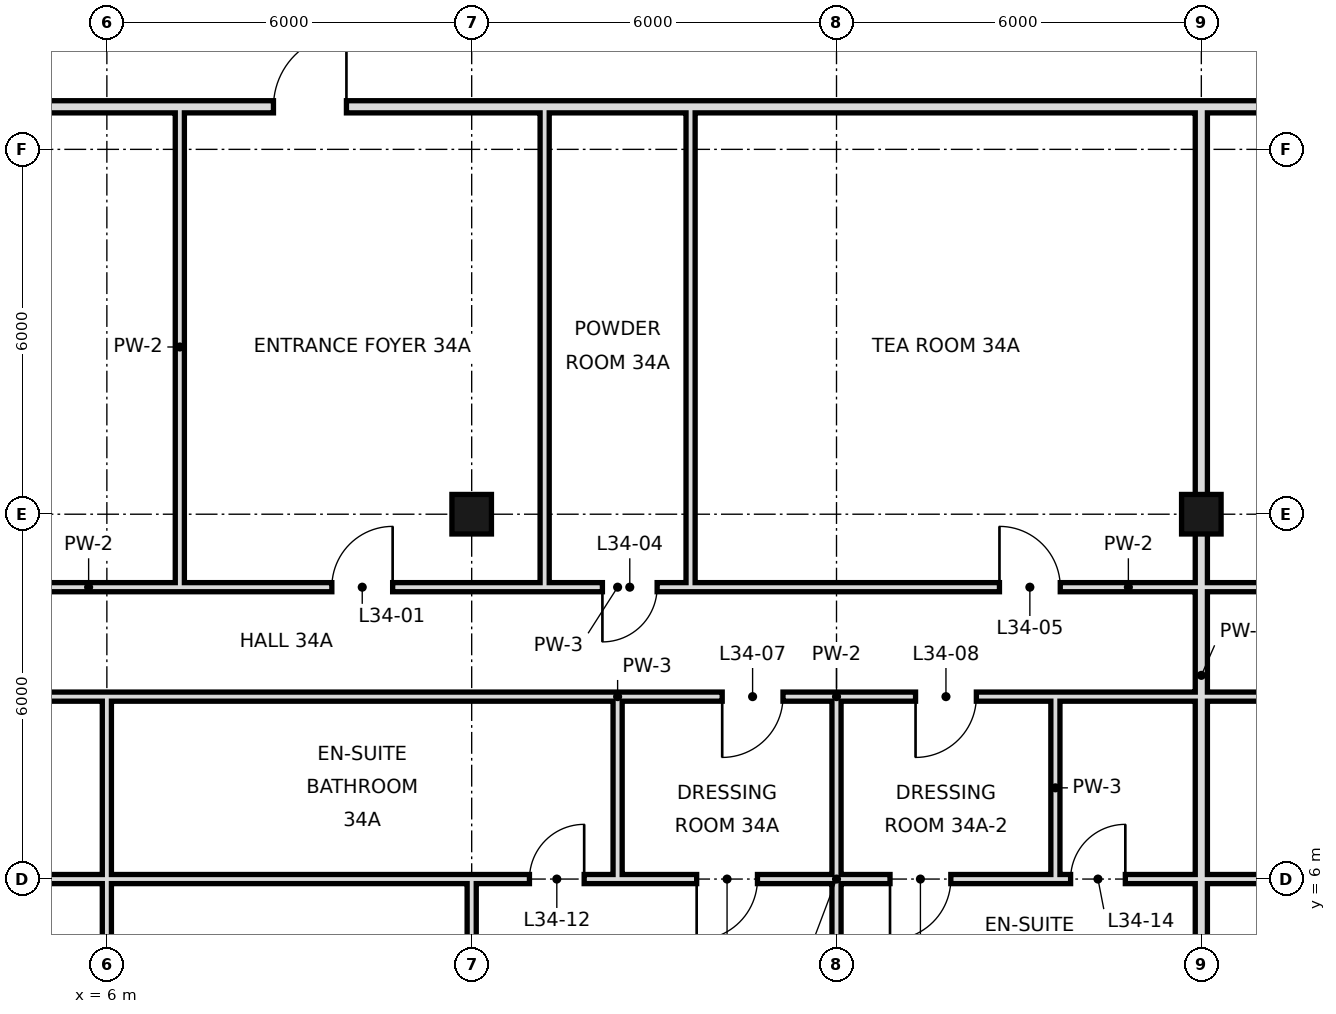
"""IFC4 building model, lengths in metres.
Left out: names, types, materials, properties, quantities, classifications, styles, units other than length and angle.
Written with IfcOpenShell. Run it as: python <this file> out.ifc"""

import sys

from ifc_helpers import new_model, si_unit, direction, frame, frame_2d, origin, origin_2d, place, context, subcontext, project, spatial, rectangle, hollow_rectangle, extrude, element, fill, save


model = new_model("IFC4")
c1 = context("Model", 3, precision=1e-05, world=origin(), true_north=direction((0.0, 1.0)))
c2 = subcontext(c1, "Body", "Model", "MODEL_VIEW")
j1 = project(units=[si_unit("LENGTHUNIT", "METRE"), si_unit("PLANEANGLEUNIT", "RADIAN")], contexts=[c1])
p1 = place(None, origin())
s1 = spatial("IfcSite", under=j1, at=p1, CompositionType="ELEMENT")
p2 = place(p1, origin())
s2 = spatial("IfcBuilding", under=s1, at=p2, CompositionType="ELEMENT")
p3 = place(p2, frame((0.0, 0.0, 151.0)))
s3 = spatial("IfcBuildingStorey", under=s2, at=p3, CompositionType="ELEMENT", Elevation=151.0)
for number, where, z_axis, x_axis in (
    (1, (12.0, 12.0, 0.0), (0.0, 0.0, 1.0), (1.0, 0.0, 0.0)),
    (2, (24.0, 12.0, 0.0), (0.0, 0.0, 1.0), (1.0, 0.0, 0.0)),
):
    element("IfcColumn", number, at=place(p3, frame(where, z_axis=z_axis, x_axis=x_axis)), inside=s3, PredefinedType="COLUMN", context=c2, shape_type="SweptSolid", body=[
        extrude(hollow_rectangle(XDim=0.65, YDim=0.65, WallThickness=0.032, at=origin_2d()), origin(), (0.0, 0.0, 1.0), 3.6),
    ])
p4 = place(p3, frame((12.0, 0.0, 0.0), z_axis=(0.0, 0.0, 1.0), x_axis=(0.0, 1.0, 0.0)))
e3 = element("IfcWall", 3, at=p4, inside=s3, PredefinedType="PARTITIONING", context=c2, shape_type="SweptSolid", body=[
    extrude(rectangle(XDim=6.0, YDim=0.15, at=frame_2d((3.0, 0.0))), origin(), (0.0, 0.0, 1.0), 2.72),
])
p5 = place(p4, frame((3.4, 0.0, 0.0)))
e4 = element("IfcOpeningElement", 4, at=p5, cuts=e3, PredefinedType="OPENING", context=c2, shape_type="SweptSolid", body=[
    extrude(rectangle(XDim=1.0, YDim=2.4, at=frame_2d((0.5, 1.2))), frame((0.0, 0.085, 0.0), z_axis=(0.0, -1.0, 0.0), x_axis=(1.0, 0.0, 0.0)), (0.0, 0.0, 1.0), 0.17),
])
p6 = place(p3, frame((13.2, 10.8, 0.0), z_axis=(0.0, 0.0, 1.0), x_axis=(0.0, 1.0, 0.0)))
e5 = element("IfcWall", 5, at=p6, inside=s3, PredefinedType="PARTITIONING", context=c2, shape_type="SweptSolid", body=[
    extrude(rectangle(XDim=7.9, YDim=0.15, at=frame_2d((3.95, 0.0))), origin(), (0.0, 0.0, 1.0), 3.42),
])
p7 = place(p3, frame((14.4, 6.0, 0.0), z_axis=(0.0, 0.0, 1.0), x_axis=(0.0, 1.0, 0.0)))
e6 = element("IfcWall", 6, at=p7, inside=s3, PredefinedType="PARTITIONING", context=c2, shape_type="SweptSolid", body=[
    extrude(rectangle(XDim=3.0, YDim=0.15, at=frame_2d((1.5, 0.0))), origin(), (0.0, 0.0, 1.0), 3.42),
])
p8 = place(p3, frame((15.6, 10.8, 0.0), z_axis=(0.0, 0.0, 1.0), x_axis=(0.0, 1.0, 0.0)))
e7 = element("IfcWall", 7, at=p8, inside=s3, PredefinedType="PARTITIONING", context=c2, shape_type="SweptSolid", body=[
    extrude(rectangle(XDim=7.9, YDim=0.15, at=frame_2d((3.95, 0.0))), origin(), (0.0, 0.0, 1.0), 3.42),
])
p9 = place(p3, frame((18.0, -0.6, 0.0), z_axis=(0.0, 0.0, 1.0), x_axis=(0.0, 1.0, 0.0)))
e8 = element("IfcWall", 8, at=p9, inside=s3, PredefinedType="PARTITIONING", context=c2, shape_type="SweptSolid", body=[
    extrude(rectangle(XDim=9.6, YDim=0.15, at=frame_2d((4.8, 0.0))), origin(), (0.0, 0.0, 1.0), 2.72),
])
p10 = place(p3, frame((21.6, 6.0, 0.0), z_axis=(0.0, 0.0, 1.0), x_axis=(0.0, 1.0, 0.0)))
e9 = element("IfcWall", 9, at=p10, inside=s3, PredefinedType="PARTITIONING", context=c2, shape_type="SweptSolid", body=[
    extrude(rectangle(XDim=3.0, YDim=0.15, at=frame_2d((1.5, 0.0))), origin(), (0.0, 0.0, 1.0), 3.42),
])
p11 = place(p3, frame((24.0, 0.0, 0.0), z_axis=(0.0, 0.0, 1.0), x_axis=(0.0, 1.0, 0.0)))
e10 = element("IfcWall", 10, at=p11, inside=s3, PredefinedType="SOLIDWALL", context=c2, shape_type="SweptSolid", body=[
    extrude(rectangle(XDim=18.7, YDim=0.2, at=frame_2d((9.35, 0.0))), origin(), (0.0, 0.0, 1.0), 2.72),
])
p12 = place(p3, frame((6.0, -0.6, 0.0), z_axis=(0.0, 0.0, 1.0), x_axis=(0.0, 1.0, 0.0)))
e11 = element("IfcWall", 11, at=p12, inside=s3, PredefinedType="PARTITIONING", context=c2, shape_type="SweptSolid", body=[
    extrude(rectangle(XDim=6.6, YDim=0.15, at=frame_2d((3.3, 0.0))), origin(), (0.0, 0.0, 1.0), 2.72),
])
p13 = place(p3, frame((6.0, 6.0, 0.0), z_axis=(0.0, 0.0, 1.0), x_axis=(0.0, 1.0, 0.0)))
e12 = element("IfcWall", 12, at=p13, inside=s3, PredefinedType="PARTITIONING", context=c2, shape_type="SweptSolid", body=[
    extrude(rectangle(XDim=3.0, YDim=0.15, at=frame_2d((1.5, 0.0))), origin(), (0.0, 0.0, 1.0), 2.72),
])
p14 = place(p3, frame((7.2, 10.8, 0.0), z_axis=(0.0, 0.0, 1.0), x_axis=(0.0, 1.0, 0.0)))
e13 = element("IfcWall", 13, at=p14, inside=s3, PredefinedType="PARTITIONING", context=c2, shape_type="SweptSolid", body=[
    extrude(rectangle(XDim=7.9, YDim=0.15, at=frame_2d((3.95, 0.0))), origin(), (0.0, 0.0, 1.0), 3.42),
])
p15 = place(p3, frame((-1.8, 10.8, 0.0), z_axis=(0.0, 0.0, 1.0), x_axis=(1.0, 0.0, 0.0)))
e14 = element("IfcWall", 14, at=p15, inside=s3, PredefinedType="PARTITIONING", context=c2, shape_type="SweptSolid", body=[
    extrude(rectangle(XDim=15.0, YDim=0.15, at=frame_2d((7.5, 0.0))), origin(), (0.0, 0.0, 1.0), 3.42),
])
p16 = place(p15, frame((11.5, 0.0, 0.0)))
e15 = element("IfcOpeningElement", 15, at=p16, cuts=e14, PredefinedType="OPENING", context=c2, shape_type="SweptSolid", body=[
    extrude(rectangle(XDim=1.0, YDim=2.4, at=frame_2d((0.5, 1.2))), frame((0.0, 0.085, 0.0), z_axis=(0.0, -1.0, 0.0), x_axis=(1.0, 0.0, 0.0)), (0.0, 0.0, 1.0), 0.17),
])
p17 = place(p15, frame((5.5, 0.0, 0.0)))
e16 = element("IfcOpeningElement", 16, at=p17, cuts=e14, PredefinedType="OPENING", context=c2, shape_type="SweptSolid", body=[
    extrude(rectangle(XDim=1.0, YDim=2.4, at=frame_2d((0.5, 1.2))), frame((0.0, 0.085, 0.0), z_axis=(0.0, -1.0, 0.0), x_axis=(1.0, 0.0, 0.0)), (0.0, 0.0, 1.0), 0.17),
])
p18 = place(p3, frame((15.6, 10.8, 0.0), z_axis=(0.0, 0.0, 1.0), x_axis=(1.0, 0.0, 0.0)))
e17 = element("IfcWall", 17, at=p18, inside=s3, PredefinedType="PARTITIONING", context=c2, shape_type="SweptSolid", body=[
    extrude(rectangle(XDim=14.4, YDim=0.15, at=frame_2d((7.2, 0.0))), origin(), (0.0, 0.0, 1.0), 3.42),
])
p19 = place(p18, frame((5.08, 0.0, 0.0)))
e18 = element("IfcOpeningElement", 18, at=p19, cuts=e17, PredefinedType="OPENING", context=c2, shape_type="SweptSolid", body=[
    extrude(rectangle(XDim=1.0, YDim=2.4, at=frame_2d((0.5, 1.2))), frame((0.0, 0.085, 0.0), z_axis=(0.0, -1.0, 0.0), x_axis=(1.0, 0.0, 0.0)), (0.0, 0.0, 1.0), 0.17),
])
p20 = place(p18, frame((10.9, 0.0, 0.0)))
e19 = element("IfcOpeningElement", 19, at=p20, cuts=e17, PredefinedType="OPENING", context=c2, shape_type="SweptSolid", body=[
    extrude(rectangle(XDim=1.0, YDim=2.4, at=frame_2d((0.5, 1.2))), frame((0.0, 0.085, 0.0), z_axis=(0.0, -1.0, 0.0), x_axis=(1.0, 0.0, 0.0)), (0.0, 0.0, 1.0), 0.17),
])
p21 = place(p3, frame((13.2, 10.8, 0.0), z_axis=(0.0, 0.0, 1.0), x_axis=(1.0, 0.0, 0.0)))
e20 = element("IfcWall", 20, at=p21, inside=s3, PredefinedType="PARTITIONING", context=c2, shape_type="SweptSolid", body=[
    extrude(rectangle(XDim=2.4, YDim=0.15, at=frame_2d((1.2, 0.0))), origin(), (0.0, 0.0, 1.0), 3.42),
])
p22 = place(p21, frame((0.95, 0.0, 0.0)))
e21 = element("IfcOpeningElement", 21, at=p22, cuts=e20, PredefinedType="OPENING", context=c2, shape_type="SweptSolid", body=[
    extrude(rectangle(XDim=0.9, YDim=2.4, at=frame_2d((0.45, 1.2))), frame((0.0, 0.085, 0.0), z_axis=(0.0, -1.0, 0.0), x_axis=(1.0, 0.0, 0.0)), (0.0, 0.0, 1.0), 0.17),
])
p23 = place(p3, frame((3.1, 18.7, 0.0), z_axis=(0.0, 0.0, 1.0), x_axis=(1.0, 0.0, 0.0)))
e22 = element("IfcWall", 22, at=p23, inside=s3, PredefinedType="SOLIDWALL", context=c2, shape_type="SweptSolid", body=[
    extrude(rectangle(XDim=41.8, YDim=0.2, at=frame_2d((20.9, 0.0))), origin(), (0.0, 0.0, 1.0), 2.72),
])
p24 = place(p23, frame((5.64, 0.0, 0.0)))
e23 = element("IfcOpeningElement", 23, at=p24, cuts=e22, PredefinedType="OPENING", context=c2, shape_type="SweptSolid", body=[
    extrude(rectangle(XDim=1.2, YDim=2.4, at=frame_2d((0.6, 1.2))), frame((0.0, 0.11, 0.0), z_axis=(0.0, -1.0, 0.0), x_axis=(1.0, 0.0, 0.0)), (0.0, 0.0, 1.0), 0.22),
])
p25 = place(p23, frame((24.16, 0.0, 0.0)))
e24 = element("IfcOpeningElement", 24, at=p25, cuts=e22, PredefinedType="OPENING", context=c2, shape_type="SweptSolid", body=[
    extrude(rectangle(XDim=1.2, YDim=2.4, at=frame_2d((0.6, 1.2))), frame((0.0, 0.11, 0.0), z_axis=(0.0, -1.0, 0.0), x_axis=(1.0, 0.0, 0.0)), (0.0, 0.0, 1.0), 0.22),
])
p26 = place(p3, frame((-6.0, 6.0, 0.0), z_axis=(0.0, 0.0, 1.0), x_axis=(1.0, 0.0, 0.0)))
e25 = element("IfcWall", 25, at=p26, inside=s3, PredefinedType="PARTITIONING", context=c2, shape_type="SweptSolid", body=[
    extrude(rectangle(XDim=12.0, YDim=0.15, at=frame_2d((6.0, 0.0))), origin(), (0.0, 0.0, 1.0), 2.97),
])
p27 = place(p26, frame((7.04, 0.0, 0.0)))
e26 = element("IfcOpeningElement", 26, at=p27, cuts=e25, PredefinedType="OPENING", context=c2, shape_type="SweptSolid", body=[
    extrude(rectangle(XDim=1.8, YDim=2.4, at=frame_2d((0.9, 1.2))), frame((0.0, 0.085, 0.0), z_axis=(0.0, -1.0, 0.0), x_axis=(1.0, 0.0, 0.0)), (0.0, 0.0, 1.0), 0.17),
])
p28 = place(p3, frame((14.4, 6.0, 0.0), z_axis=(0.0, 0.0, 1.0), x_axis=(1.0, 0.0, 0.0)))
e27 = element("IfcWall", 27, at=p28, inside=s3, PredefinedType="PARTITIONING", context=c2, shape_type="SweptSolid", body=[
    extrude(rectangle(XDim=7.2, YDim=0.15, at=frame_2d((3.6, 0.0))), origin(), (0.0, 0.0, 1.0), 2.97),
])
p29 = place(p28, frame((1.3, 0.0, 0.0)))
e28 = element("IfcOpeningElement", 28, at=p29, cuts=e27, PredefinedType="OPENING", context=c2, shape_type="SweptSolid", body=[
    extrude(rectangle(XDim=1.0, YDim=2.4, at=frame_2d((0.5, 1.2))), frame((0.0, 0.085, 0.0), z_axis=(0.0, -1.0, 0.0), x_axis=(1.0, 0.0, 0.0)), (0.0, 0.0, 1.0), 0.17),
])
p30 = place(p28, frame((4.48, 0.0, 0.0)))
e29 = element("IfcOpeningElement", 29, at=p30, cuts=e27, PredefinedType="OPENING", context=c2, shape_type="SweptSolid", body=[
    extrude(rectangle(XDim=1.0, YDim=2.4, at=frame_2d((0.5, 1.2))), frame((0.0, 0.085, 0.0), z_axis=(0.0, -1.0, 0.0), x_axis=(1.0, 0.0, 0.0)), (0.0, 0.0, 1.0), 0.17),
])
p31 = place(p3, frame((24.0, 6.0, 0.0), z_axis=(0.0, 0.0, 1.0), x_axis=(1.0, 0.0, 0.0)))
e30 = element("IfcWall", 30, at=p31, inside=s3, PredefinedType="PARTITIONING", context=c2, shape_type="SweptSolid", body=[
    extrude(rectangle(XDim=12.0, YDim=0.15, at=frame_2d((6.0, 0.0))), origin(), (0.0, 0.0, 1.0), 2.97),
])
p32 = place(p31, frame((9.95, 0.0, 0.0)))
e31 = element("IfcOpeningElement", 31, at=p32, cuts=e30, PredefinedType="OPENING", context=c2, shape_type="SweptSolid", body=[
    extrude(rectangle(XDim=1.8, YDim=2.4, at=frame_2d((0.9, 1.2))), frame((0.0, 0.085, 0.0), z_axis=(0.0, -1.0, 0.0), x_axis=(1.0, 0.0, 0.0)), (0.0, 0.0, 1.0), 0.17),
])
p33 = place(p3, frame((6.0, 6.0, 0.0), z_axis=(0.0, 0.0, 1.0), x_axis=(1.0, 0.0, 0.0)))
e32 = element("IfcWall", 32, at=p33, inside=s3, PredefinedType="PARTITIONING", context=c2, shape_type="SweptSolid", body=[
    extrude(rectangle(XDim=8.4, YDim=0.15, at=frame_2d((4.2, 0.0))), origin(), (0.0, 0.0, 1.0), 2.97),
])
p34 = place(p33, frame((6.95, 0.0, 0.0)))
e33 = element("IfcOpeningElement", 33, at=p34, cuts=e32, PredefinedType="OPENING", context=c2, shape_type="SweptSolid", body=[
    extrude(rectangle(XDim=0.9, YDim=2.4, at=frame_2d((0.45, 1.2))), frame((0.0, 0.085, 0.0), z_axis=(0.0, -1.0, 0.0), x_axis=(1.0, 0.0, 0.0)), (0.0, 0.0, 1.0), 0.17),
])
p35 = place(p3, frame((21.6, 6.0, 0.0), z_axis=(0.0, 0.0, 1.0), x_axis=(1.0, 0.0, 0.0)))
e34 = element("IfcWall", 34, at=p35, inside=s3, PredefinedType="PARTITIONING", context=c2, shape_type="SweptSolid", body=[
    extrude(rectangle(XDim=2.4, YDim=0.15, at=frame_2d((1.2, 0.0))), origin(), (0.0, 0.0, 1.0), 2.97),
])
p36 = place(p35, frame((0.25, 0.0, 0.0)))
e35 = element("IfcOpeningElement", 35, at=p36, cuts=e34, PredefinedType="OPENING", context=c2, shape_type="SweptSolid", body=[
    extrude(rectangle(XDim=0.9, YDim=2.4, at=frame_2d((0.45, 1.2))), frame((0.0, 0.085, 0.0), z_axis=(0.0, -1.0, 0.0), x_axis=(1.0, 0.0, 0.0)), (0.0, 0.0, 1.0), 0.17),
])
p37 = place(p3, frame((-6.6, 9.0, 0.0), z_axis=(0.0, 0.0, 1.0), x_axis=(1.0, 0.0, 0.0)))
e36 = element("IfcWall", 36, at=p37, inside=s3, PredefinedType="PARTITIONING", context=c2, shape_type="SweptSolid", body=[
    extrude(rectangle(XDim=12.6, YDim=0.15, at=frame_2d((6.3, 0.0))), origin(), (0.0, 0.0, 1.0), 3.42),
])
p38 = place(p37, frame((7.64, 0.0, 0.0)))
e37 = element("IfcOpeningElement", 37, at=p38, cuts=e36, PredefinedType="OPENING", context=c2, shape_type="SweptSolid", body=[
    extrude(rectangle(XDim=1.8, YDim=2.4, at=frame_2d((0.9, 1.2))), frame((0.0, 0.085, 0.0), z_axis=(0.0, -1.0, 0.0), x_axis=(1.0, 0.0, 0.0)), (0.0, 0.0, 1.0), 0.17),
])
p39 = place(p3, frame((14.4, 9.0, 0.0), z_axis=(0.0, 0.0, 1.0), x_axis=(1.0, 0.0, 0.0)))
e38 = element("IfcWall", 38, at=p39, inside=s3, PredefinedType="PARTITIONING", context=c2, shape_type="SweptSolid", body=[
    extrude(rectangle(XDim=7.2, YDim=0.15, at=frame_2d((3.6, 0.0))), origin(), (0.0, 0.0, 1.0), 3.42),
])
p40 = place(p39, frame((1.72, 0.0, 0.0)))
e39 = element("IfcOpeningElement", 39, at=p40, cuts=e38, PredefinedType="OPENING", context=c2, shape_type="SweptSolid", body=[
    extrude(rectangle(XDim=1.0, YDim=2.4, at=frame_2d((0.5, 1.2))), frame((0.0, 0.085, 0.0), z_axis=(0.0, -1.0, 0.0), x_axis=(1.0, 0.0, 0.0)), (0.0, 0.0, 1.0), 0.17),
])
p41 = place(p39, frame((4.9, 0.0, 0.0)))
e40 = element("IfcOpeningElement", 40, at=p41, cuts=e38, PredefinedType="OPENING", context=c2, shape_type="SweptSolid", body=[
    extrude(rectangle(XDim=1.0, YDim=2.4, at=frame_2d((0.5, 1.2))), frame((0.0, 0.085, 0.0), z_axis=(0.0, -1.0, 0.0), x_axis=(1.0, 0.0, 0.0)), (0.0, 0.0, 1.0), 0.17),
])
p42 = place(p3, frame((24.0, 9.0, 0.0), z_axis=(0.0, 0.0, 1.0), x_axis=(1.0, 0.0, 0.0)))
e41 = element("IfcWall", 41, at=p42, inside=s3, PredefinedType="PARTITIONING", context=c2, shape_type="SweptSolid", body=[
    extrude(rectangle(XDim=27.6, YDim=0.15, at=frame_2d((13.8, 0.0))), origin(), (0.0, 0.0, 1.0), 3.42),
])
p43 = place(p42, frame((3.16, 0.0, 0.0)))
e42 = element("IfcOpeningElement", 42, at=p43, cuts=e41, PredefinedType="OPENING", context=c2, shape_type="SweptSolid", body=[
    extrude(rectangle(XDim=1.8, YDim=2.4, at=frame_2d((0.9, 1.2))), frame((0.0, 0.085, 0.0), z_axis=(0.0, -1.0, 0.0), x_axis=(1.0, 0.0, 0.0)), (0.0, 0.0, 1.0), 0.17),
])
p44 = place(p42, frame((13.6, 0.0, 0.0)))
e43 = element("IfcOpeningElement", 43, at=p44, cuts=e41, PredefinedType="OPENING", context=c2, shape_type="SweptSolid", body=[
    extrude(rectangle(XDim=1.0, YDim=2.4, at=frame_2d((0.5, 1.2))), frame((0.0, 0.085, 0.0), z_axis=(0.0, -1.0, 0.0), x_axis=(1.0, 0.0, 0.0)), (0.0, 0.0, 1.0), 0.17),
])
p45 = place(p42, frame((21.4, 0.0, 0.0)))
e44 = element("IfcOpeningElement", 44, at=p45, cuts=e41, PredefinedType="OPENING", context=c2, shape_type="SweptSolid", body=[
    extrude(rectangle(XDim=1.0, YDim=2.4, at=frame_2d((0.5, 1.2))), frame((0.0, 0.085, 0.0), z_axis=(0.0, -1.0, 0.0), x_axis=(1.0, 0.0, 0.0)), (0.0, 0.0, 1.0), 0.17),
])
p46 = place(p42, frame((24.88, 0.0, 0.0)))
e45 = element("IfcOpeningElement", 45, at=p46, cuts=e41, PredefinedType="OPENING", context=c2, shape_type="SweptSolid", body=[
    extrude(rectangle(XDim=1.0, YDim=2.4, at=frame_2d((0.5, 1.2))), frame((0.0, 0.085, 0.0), z_axis=(0.0, -1.0, 0.0), x_axis=(1.0, 0.0, 0.0)), (0.0, 0.0, 1.0), 0.17),
])
p47 = place(p3, frame((6.0, 9.0, 0.0), z_axis=(0.0, 0.0, 1.0), x_axis=(1.0, 0.0, 0.0)))
e46 = element("IfcWall", 46, at=p47, inside=s3, PredefinedType="PARTITIONING", context=c2, shape_type="SweptSolid", body=[
    extrude(rectangle(XDim=8.4, YDim=0.15, at=frame_2d((4.2, 0.0))), origin(), (0.0, 0.0, 1.0), 3.42),
])
p48 = place(p3, frame((21.6, 9.0, 0.0), z_axis=(0.0, 0.0, 1.0), x_axis=(1.0, 0.0, 0.0)))
e47 = element("IfcWall", 47, at=p48, inside=s3, PredefinedType="PARTITIONING", context=c2, shape_type="SweptSolid", body=[
    extrude(rectangle(XDim=2.4, YDim=0.15, at=frame_2d((1.2, 0.0))), origin(), (0.0, 0.0, 1.0), 3.42),
])
p49 = place(p16, frame((1.0, 0.0, 0.0), z_axis=(0.0, 0.0, 1.0), x_axis=(-1.0, 0.0, 0.0)))
e48 = element("IfcDoor", 48, at=p49, inside=s3, OperationType="SINGLE_SWING_LEFT", PredefinedType="DOOR", context=c2, shape_type="SweptSolid", body=[
    extrude(rectangle(XDim=1.0, YDim=2.4, at=frame_2d((0.5, 1.2))), frame((0.0, 0.025, 0.0), z_axis=(0.0, -1.0, 0.0), x_axis=(1.0, 0.0, 0.0)), (0.0, 0.0, 1.0), 0.05),
])
fill(e15, e48)
p50 = place(p22, frame((0.9, 0.0, 0.0), z_axis=(0.0, 0.0, 1.0), x_axis=(-1.0, 0.0, 0.0)))
e49 = element("IfcDoor", 49, at=p50, inside=s3, OperationType="SINGLE_SWING_RIGHT", PredefinedType="DOOR", context=c2, shape_type="SweptSolid", body=[
    extrude(rectangle(XDim=0.9, YDim=2.4, at=frame_2d((0.45, 1.2))), frame((0.0, 0.025, 0.0), z_axis=(0.0, -1.0, 0.0), x_axis=(1.0, 0.0, 0.0)), (0.0, 0.0, 1.0), 0.05),
])
fill(e21, e49)
p51 = place(p19, origin())
e50 = element("IfcDoor", 50, at=p51, inside=s3, OperationType="SINGLE_SWING_LEFT", PredefinedType="DOOR", context=c2, shape_type="SweptSolid", body=[
    extrude(rectangle(XDim=1.0, YDim=2.4, at=frame_2d((0.5, 1.2))), frame((0.0, 0.025, 0.0), z_axis=(0.0, -1.0, 0.0), x_axis=(1.0, 0.0, 0.0)), (0.0, 0.0, 1.0), 0.05),
])
fill(e18, e50)
p52 = place(p40, frame((1.0, 0.0, 0.0), z_axis=(0.0, 0.0, 1.0), x_axis=(-1.0, 0.0, 0.0)))
e51 = element("IfcDoor", 51, at=p52, inside=s3, OperationType="SINGLE_SWING_RIGHT", PredefinedType="DOOR", context=c2, shape_type="SweptSolid", body=[
    extrude(rectangle(XDim=1.0, YDim=2.4, at=frame_2d((0.5, 1.2))), frame((0.0, 0.025, 0.0), z_axis=(0.0, -1.0, 0.0), x_axis=(1.0, 0.0, 0.0)), (0.0, 0.0, 1.0), 0.05),
])
fill(e39, e51)
p53 = place(p41, frame((1.0, 0.0, 0.0), z_axis=(0.0, 0.0, 1.0), x_axis=(-1.0, 0.0, 0.0)))
e52 = element("IfcDoor", 52, at=p53, inside=s3, OperationType="SINGLE_SWING_RIGHT", PredefinedType="DOOR", context=c2, shape_type="SweptSolid", body=[
    extrude(rectangle(XDim=1.0, YDim=2.4, at=frame_2d((0.5, 1.2))), frame((0.0, 0.025, 0.0), z_axis=(0.0, -1.0, 0.0), x_axis=(1.0, 0.0, 0.0)), (0.0, 0.0, 1.0), 0.05),
])
fill(e40, e52)
p54 = place(p29, frame((1.0, 0.0, 0.0), z_axis=(0.0, 0.0, 1.0), x_axis=(-1.0, 0.0, 0.0)))
e53 = element("IfcDoor", 53, at=p54, inside=s3, OperationType="SINGLE_SWING_RIGHT", PredefinedType="DOOR", context=c2, shape_type="SweptSolid", body=[
    extrude(rectangle(XDim=1.0, YDim=2.4, at=frame_2d((0.5, 1.2))), frame((0.0, 0.025, 0.0), z_axis=(0.0, -1.0, 0.0), x_axis=(1.0, 0.0, 0.0)), (0.0, 0.0, 1.0), 0.05),
])
fill(e28, e53)
p55 = place(p34, frame((0.9, 0.0, 0.0), z_axis=(0.0, 0.0, 1.0), x_axis=(-1.0, 0.0, 0.0)))
e54 = element("IfcDoor", 54, at=p55, inside=s3, OperationType="SINGLE_SWING_LEFT", PredefinedType="DOOR", context=c2, shape_type="SweptSolid", body=[
    extrude(rectangle(XDim=0.9, YDim=2.4, at=frame_2d((0.45, 1.2))), frame((0.0, 0.025, 0.0), z_axis=(0.0, -1.0, 0.0), x_axis=(1.0, 0.0, 0.0)), (0.0, 0.0, 1.0), 0.05),
])
fill(e33, e54)
p56 = place(p30, frame((1.0, 0.0, 0.0), z_axis=(0.0, 0.0, 1.0), x_axis=(-1.0, 0.0, 0.0)))
e55 = element("IfcDoor", 55, at=p56, inside=s3, OperationType="SINGLE_SWING_RIGHT", PredefinedType="DOOR", context=c2, shape_type="SweptSolid", body=[
    extrude(rectangle(XDim=1.0, YDim=2.4, at=frame_2d((0.5, 1.2))), frame((0.0, 0.025, 0.0), z_axis=(0.0, -1.0, 0.0), x_axis=(1.0, 0.0, 0.0)), (0.0, 0.0, 1.0), 0.05),
])
fill(e29, e55)
p57 = place(p36, frame((0.9, 0.0, 0.0), z_axis=(0.0, 0.0, 1.0), x_axis=(-1.0, 0.0, 0.0)))
e56 = element("IfcDoor", 56, at=p57, inside=s3, OperationType="SINGLE_SWING_LEFT", PredefinedType="DOOR", context=c2, shape_type="SweptSolid", body=[
    extrude(rectangle(XDim=0.9, YDim=2.4, at=frame_2d((0.45, 1.2))), frame((0.0, 0.025, 0.0), z_axis=(0.0, -1.0, 0.0), x_axis=(1.0, 0.0, 0.0)), (0.0, 0.0, 1.0), 0.05),
])
fill(e35, e56)
p58 = place(p24, frame((1.2, 0.0, 0.0), z_axis=(0.0, 0.0, 1.0), x_axis=(-1.0, 0.0, 0.0)))
e57 = element("IfcDoor", 57, at=p58, inside=s3, OperationType="SINGLE_SWING_LEFT", PredefinedType="DOOR", context=c2, shape_type="SweptSolid", body=[
    extrude(rectangle(XDim=1.2, YDim=2.4, at=frame_2d((0.6, 1.2))), frame((0.0, 0.025, 0.0), z_axis=(0.0, -1.0, 0.0), x_axis=(1.0, 0.0, 0.0)), (0.0, 0.0, 1.0), 0.05),
])
fill(e23, e57)
save(model, sys.argv[1])
